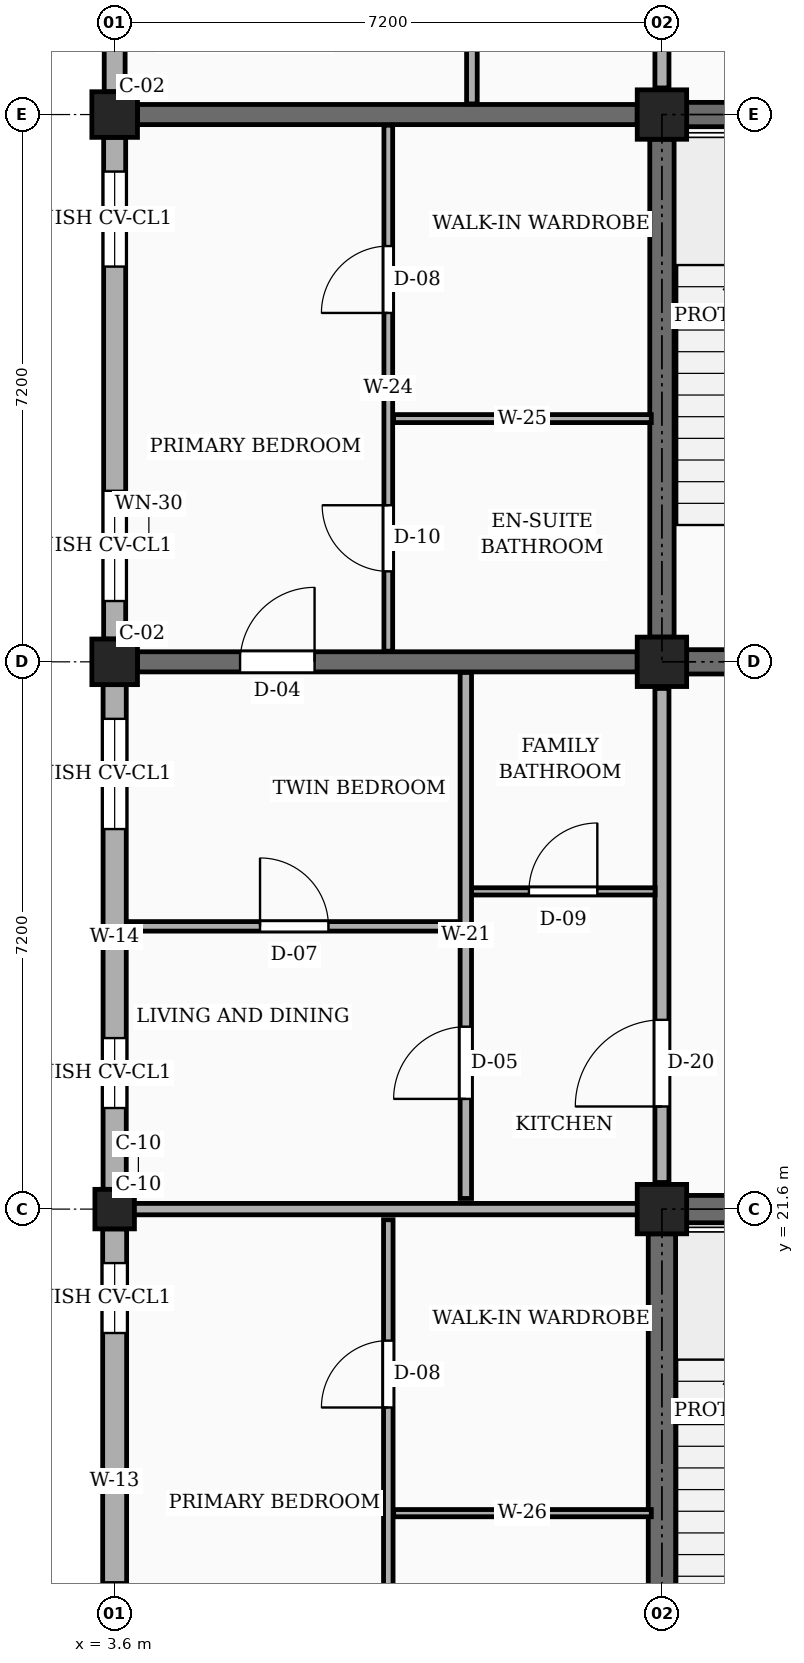
"""IFC4 building model, lengths in metres.
Left out: names, types, materials, properties, quantities, classifications, styles, units other than length and angle.
Written with IfcOpenShell. Run it as: python <this file> out.ifc"""

import sys

from ifc_helpers import new_model, si_unit, direction, frame, frame_2d, origin, origin_2d, place, context, subcontext, project, spatial, rectangle, circle, extrude, element, fill, save


model = new_model("IFC4")
c1 = context("Model", 3, precision=1e-05, world=origin(), true_north=direction((0.0, 1.0)))
c2 = subcontext(c1, "Body", "Model", "MODEL_VIEW")
j1 = project(units=[si_unit("LENGTHUNIT", "METRE"), si_unit("PLANEANGLEUNIT", "RADIAN")], contexts=[c1])
p1 = place(None, origin())
s1 = spatial("IfcSite", under=j1, at=p1, CompositionType="ELEMENT")
p2 = place(p1, origin())
s2 = spatial("IfcBuilding", under=s1, at=p2, CompositionType="ELEMENT")
p3 = place(p2, origin())
s3 = spatial("IfcBuildingStorey", under=s2, at=p3, CompositionType="ELEMENT", Elevation=0.0)
p4 = place(p3, frame((3.6, 21.6, 0.0), z_axis=(0.0, 0.0, 1.0), x_axis=(1.0, 0.0, 0.0)))
e1 = element("IfcColumn", 1, at=p4, inside=s3, PredefinedType="COLUMN", context=c2, shape_type="SweptSolid", body=[
    extrude(circle(Radius=0.26, at=origin_2d()), origin(), (0.0, 0.0, 1.0), 4.5),
])
for number, where, z_axis, x_axis in (
    (2, (3.6, 28.8, 0.0), (0.0, 0.0, 1.0), (1.0, 0.0, 0.0)),
    (3, (3.6, 36.0, 0.0), (0.0, 0.0, 1.0), (1.0, 0.0, 0.0)),
):
    element("IfcColumn", number, at=place(p3, frame(where, z_axis=z_axis, x_axis=x_axis)), inside=s3, PredefinedType="COLUMN", context=c2, shape_type="SweptSolid", body=[
        extrude(rectangle(XDim=0.6, YDim=0.6, at=origin_2d()), origin(), (0.0, 0.0, 1.0), 4.5),
    ])
for number, where, z_axis, x_axis in (
    (4, (10.8, 21.6, 0.0), (0.0, 0.0, 1.0), (1.0, 0.0, 0.0)),
    (5, (10.8, 28.8, 0.0), (0.0, 0.0, 1.0), (1.0, 0.0, 0.0)),
    (6, (10.8, 36.0, 0.0), (0.0, 0.0, 1.0), (1.0, 0.0, 0.0)),
):
    element("IfcColumn", number, at=place(p3, frame(where, z_axis=z_axis, x_axis=x_axis)), inside=s3, PredefinedType="COLUMN", context=c2, shape_type="SweptSolid", body=[
        extrude(rectangle(XDim=0.65, YDim=0.65, at=origin_2d()), origin(), (0.0, 0.0, 1.0), 4.5),
    ])
p5 = place(p3, frame((3.9, 28.8, 0.0), z_axis=(0.0, 0.0, 1.0), x_axis=(1.0, 0.0, 0.0)))
e7 = element("IfcWall", 7, at=p5, inside=s3, PredefinedType="SOLIDWALL", context=c2, shape_type="SweptSolid", body=[
    extrude(rectangle(XDim=6.575, YDim=0.265, at=frame_2d((3.288, 0.0))), origin(), (0.0, 0.0, 1.0), 3.52),
])
p6 = place(p5, frame((1.35, 0.0, 0.0)))
e8 = element("IfcOpeningElement", 8, at=p6, cuts=e7, PredefinedType="OPENING", context=c2, shape_type="SweptSolid", body=[
    extrude(rectangle(XDim=0.98, YDim=2.12, at=frame_2d((0.49, 1.06))), frame((0.0, 0.143, 0.0), z_axis=(0.0, -1.0, 0.0), x_axis=(1.0, 0.0, 0.0)), (0.0, 0.0, 1.0), 0.285),
])
p7 = place(p3, frame((3.9, 36.0, 0.0), z_axis=(0.0, 0.0, 1.0), x_axis=(1.0, 0.0, 0.0)))
e9 = element("IfcWall", 9, at=p7, inside=s3, PredefinedType="SOLIDWALL", context=c2, shape_type="SweptSolid", body=[
    extrude(rectangle(XDim=6.575, YDim=0.265, at=frame_2d((3.288, 0.0))), origin(), (0.0, 0.0, 1.0), 3.52),
])
p8 = place(p3, frame((3.6, 42.9, 0.0), z_axis=(0.0, 0.0, 1.0), x_axis=(0.0, -1.0, 0.0)))
e10 = element("IfcWall", 10, at=p8, inside=s3, PredefinedType="SOLIDWALL", context=c2, shape_type="SweptSolid", body=[
    extrude(rectangle(XDim=6.6, YDim=0.275, at=frame_2d((3.3, 0.0))), origin(), (0.0, 0.0, 1.0), 3.79),
])
p9 = place(p8, frame((0.45, 0.0, 0.78)))
e11 = element("IfcOpeningElement", 11, at=p9, cuts=e10, PredefinedType="OPENING", context=c2, shape_type="SweptSolid", body=[
    extrude(rectangle(XDim=1.05, YDim=1.44, at=frame_2d((0.525, 0.72))), frame((0.0, 0.147, 0.0), z_axis=(0.0, -1.0, 0.0), x_axis=(1.0, 0.0, 0.0)), (0.0, 0.0, 1.0), 0.295),
])
p10 = place(p8, frame((4.65, 0.0, 0.78)))
e12 = element("IfcOpeningElement", 12, at=p10, cuts=e10, PredefinedType="OPENING", context=c2, shape_type="SweptSolid", body=[
    extrude(rectangle(XDim=1.25, YDim=1.44, at=frame_2d((0.625, 0.72))), frame((0.0, 0.147, 0.0), z_axis=(0.0, -1.0, 0.0), x_axis=(1.0, 0.0, 0.0)), (0.0, 0.0, 1.0), 0.295),
])
p11 = place(p3, frame((3.6, 35.7, 0.0), z_axis=(0.0, 0.0, 1.0), x_axis=(0.0, -1.0, 0.0)))
e13 = element("IfcWall", 13, at=p11, inside=s3, PredefinedType="SOLIDWALL", context=c2, shape_type="SweptSolid", body=[
    extrude(rectangle(XDim=6.6, YDim=0.29, at=frame_2d((3.3, 0.0))), origin(), (0.0, 0.0, 1.0), 3.79),
])
p12 = place(p11, frame((0.45, 0.0, 0.78)))
e14 = element("IfcOpeningElement", 14, at=p12, cuts=e13, PredefinedType="OPENING", context=c2, shape_type="SweptSolid", body=[
    extrude(rectangle(XDim=1.25, YDim=1.44, at=frame_2d((0.625, 0.72))), frame((0.0, 0.155, 0.0), z_axis=(0.0, -1.0, 0.0), x_axis=(1.0, 0.0, 0.0)), (0.0, 0.0, 1.0), 0.31),
])
p13 = place(p11, frame((4.65, 0.0, 0.78)))
e15 = element("IfcOpeningElement", 15, at=p13, cuts=e13, PredefinedType="OPENING", context=c2, shape_type="SweptSolid", body=[
    extrude(rectangle(XDim=1.45, YDim=1.44, at=frame_2d((0.725, 0.72))), frame((0.0, 0.155, 0.0), z_axis=(0.0, -1.0, 0.0), x_axis=(1.0, 0.0, 0.0)), (0.0, 0.0, 1.0), 0.31),
])
p14 = place(p3, frame((3.6, 28.5, 0.0), z_axis=(0.0, 0.0, 1.0), x_axis=(0.0, -1.0, 0.0)))
e16 = element("IfcWall", 16, at=p14, inside=s3, PredefinedType="SOLIDWALL", context=c2, shape_type="SweptSolid", body=[
    extrude(rectangle(XDim=6.64, YDim=0.305, at=frame_2d((3.32, 0.0))), origin(), (0.0, 0.0, 1.0), 3.79),
])
p15 = place(p14, frame((0.45, 0.0, 0.78)))
e17 = element("IfcOpeningElement", 17, at=p15, cuts=e16, PredefinedType="OPENING", context=c2, shape_type="SweptSolid", body=[
    extrude(rectangle(XDim=1.45, YDim=1.44, at=frame_2d((0.725, 0.72))), frame((0.0, 0.163, 0.0), z_axis=(0.0, -1.0, 0.0), x_axis=(1.0, 0.0, 0.0)), (0.0, 0.0, 1.0), 0.325),
])
p16 = place(p14, frame((4.65, 0.0, 0.78)))
e18 = element("IfcOpeningElement", 18, at=p16, cuts=e16, PredefinedType="OPENING", context=c2, shape_type="SweptSolid", body=[
    extrude(rectangle(XDim=0.92, YDim=1.15, at=frame_2d((0.46, 0.575))), frame((0.0, 0.163, 0.0), z_axis=(0.0, -1.0, 0.0), x_axis=(1.0, 0.0, 0.0)), (0.0, 0.0, 1.0), 0.325),
])
p17 = place(p3, frame((3.6, 21.34, 0.0), z_axis=(0.0, 0.0, 1.0), x_axis=(0.0, -1.0, 0.0)))
e19 = element("IfcWall", 19, at=p17, inside=s3, PredefinedType="SOLIDWALL", context=c2, shape_type="SweptSolid", body=[
    extrude(rectangle(XDim=6.64, YDim=0.315, at=frame_2d((3.32, 0.0))), origin(), (0.0, 0.0, 1.0), 3.79),
])
p18 = place(p17, frame((0.45, 0.0, 0.78)))
e20 = element("IfcOpeningElement", 20, at=p18, cuts=e19, PredefinedType="OPENING", context=c2, shape_type="SweptSolid", body=[
    extrude(rectangle(XDim=0.92, YDim=1.15, at=frame_2d((0.46, 0.575))), frame((0.0, 0.167, 0.0), z_axis=(0.0, -1.0, 0.0), x_axis=(1.0, 0.0, 0.0)), (0.0, 0.0, 1.0), 0.335),
])
p19 = place(p17, frame((4.65, 0.0, 0.78)))
e21 = element("IfcOpeningElement", 21, at=p19, cuts=e19, PredefinedType="OPENING", context=c2, shape_type="SweptSolid", body=[
    extrude(rectangle(XDim=1.08, YDim=1.15, at=frame_2d((0.54, 0.575))), frame((0.0, 0.167, 0.0), z_axis=(0.0, -1.0, 0.0), x_axis=(1.0, 0.0, 0.0)), (0.0, 0.0, 1.0), 0.335),
])
p20 = place(p3, frame((10.8, 14.725, 0.0), z_axis=(0.0, 0.0, 1.0), x_axis=(0.0, 1.0, 0.0)))
e22 = element("IfcWall", 22, at=p20, inside=s3, PredefinedType="SHEAR", context=c2, shape_type="SweptSolid", body=[
    extrude(rectangle(XDim=6.55, YDim=0.36, at=frame_2d((3.275, 0.0))), origin(), (0.0, 0.0, 1.0), 4.22),
])
p21 = place(p3, frame((11.125, 21.6, 0.0), z_axis=(0.0, 0.0, 1.0), x_axis=(1.0, 0.0, 0.0)))
e23 = element("IfcWall", 23, at=p21, inside=s3, PredefinedType="SHEAR", context=c2, shape_type="SweptSolid", body=[
    extrude(rectangle(XDim=6.55, YDim=0.36, at=frame_2d((3.275, 0.0))), origin(), (0.0, 0.0, 1.0), 4.22),
])
for number, where, z_axis, x_axis in (
    (24, (10.8, 29.125, 0.0), (0.0, 0.0, 1.0), (0.0, 1.0, 0.0)),
    (25, (11.125, 36.0, 0.0), (0.0, 0.0, 1.0), (1.0, 0.0, 0.0)),
):
    element("IfcWall", number, at=place(p3, frame(where, z_axis=z_axis, x_axis=x_axis)), inside=s3, PredefinedType="SHEAR", context=c2, shape_type="SweptSolid", body=[
        extrude(rectangle(XDim=6.55, YDim=0.32, at=frame_2d((3.275, 0.0))), origin(), (0.0, 0.0, 1.0), 4.22),
    ])
p22 = place(p3, frame((11.125, 28.8, 0.0), z_axis=(0.0, 0.0, 1.0), x_axis=(1.0, 0.0, 0.0)))
e26 = element("IfcWall", 26, at=p22, inside=s3, PredefinedType="SHEAR", context=c2, shape_type="SweptSolid", body=[
    extrude(rectangle(XDim=6.55, YDim=0.32, at=frame_2d((3.275, 0.0))), origin(), (0.0, 0.0, 1.0), 4.22),
])
p23 = place(p22, frame((4.425, 0.0, 0.0)))
e27 = element("IfcOpeningElement", 27, at=p23, cuts=e26, PredefinedType="OPENING", context=c2, shape_type="SweptSolid", body=[
    extrude(rectangle(XDim=1.1, YDim=2.15, at=frame_2d((0.55, 1.075))), frame((0.0, 0.17, 0.0), z_axis=(0.0, -1.0, 0.0), x_axis=(1.0, 0.0, 0.0)), (0.0, 0.0, 1.0), 0.34),
])
p24 = place(p3, frame((10.8, 21.95, 0.0), z_axis=(0.0, 0.0, 1.0), x_axis=(0.0, 1.0, 0.0)))
e28 = element("IfcWall", 28, at=p24, inside=s3, PredefinedType="PARTITIONING", context=c2, shape_type="SweptSolid", body=[
    extrude(rectangle(XDim=6.5, YDim=0.185, at=frame_2d((3.25, 0.0))), origin(), (0.0, 0.0, 1.0), 3.47),
])
p25 = place(p24, frame((1.0, 0.0, 0.0)))
e29 = element("IfcOpeningElement", 29, at=p25, cuts=e28, PredefinedType="OPENING", context=c2, shape_type="SweptSolid", body=[
    extrude(rectangle(XDim=1.14, YDim=2.18, at=frame_2d((0.57, 1.09))), frame((0.0, 0.103, 0.0), z_axis=(0.0, -1.0, 0.0), x_axis=(1.0, 0.0, 0.0)), (0.0, 0.0, 1.0), 0.205),
])
p26 = place(p3, frame((10.8, 36.35, 0.0), z_axis=(0.0, 0.0, 1.0), x_axis=(0.0, 1.0, 0.0)))
e30 = element("IfcWall", 30, at=p26, inside=s3, PredefinedType="PARTITIONING", context=c2, shape_type="SweptSolid", body=[
    extrude(rectangle(XDim=6.5, YDim=0.185, at=frame_2d((3.25, 0.0))), origin(), (0.0, 0.0, 1.0), 3.47),
])
p27 = place(p26, frame((1.0, 0.0, 0.0)))
e31 = element("IfcOpeningElement", 31, at=p27, cuts=e30, PredefinedType="OPENING", context=c2, shape_type="SweptSolid", body=[
    extrude(rectangle(XDim=1.0, YDim=2.15, at=frame_2d((0.5, 1.075))), frame((0.0, 0.103, 0.0), z_axis=(0.0, -1.0, 0.0), x_axis=(1.0, 0.0, 0.0)), (0.0, 0.0, 1.0), 0.205),
])
p28 = place(p3, frame((3.775, 21.6, 0.0), z_axis=(0.0, 0.0, 1.0), x_axis=(1.0, 0.0, 0.0)))
e32 = element("IfcWall", 32, at=p28, inside=s3, PredefinedType="PARTITIONING", context=c2, shape_type="SweptSolid", body=[
    extrude(rectangle(XDim=6.885, YDim=0.15, at=frame_2d((3.442, 0.0))), origin(), (0.0, 0.0, 1.0), 3.27),
])
p29 = place(p3, frame((7.2, 14.54, 0.0), z_axis=(0.0, 0.0, 1.0), x_axis=(0.0, 1.0, 0.0)))
e33 = element("IfcWall", 33, at=p29, inside=s3, PredefinedType="PARTITIONING", context=c2, shape_type="SweptSolid", body=[
    extrude(rectangle(XDim=6.92, YDim=0.125, at=frame_2d((3.46, 0.0))), origin(), (0.0, 0.0, 1.0), 3.655),
])
p30 = place(p29, frame((1.05, 0.0, 0.0)))
e34 = element("IfcOpeningElement", 34, at=p30, cuts=e33, PredefinedType="OPENING", context=c2, shape_type="SweptSolid", body=[
    extrude(rectangle(XDim=0.87, YDim=2.05, at=frame_2d((0.435, 1.025))), frame((0.0, 0.073, 0.0), z_axis=(0.0, -1.0, 0.0), x_axis=(1.0, 0.0, 0.0)), (0.0, 0.0, 1.0), 0.145),
])
p31 = place(p29, frame((4.45, 0.0, 0.0)))
e35 = element("IfcOpeningElement", 35, at=p31, cuts=e33, PredefinedType="OPENING", context=c2, shape_type="SweptSolid", body=[
    extrude(rectangle(XDim=0.88, YDim=2.08, at=frame_2d((0.44, 1.04))), frame((0.0, 0.073, 0.0), z_axis=(0.0, -1.0, 0.0), x_axis=(1.0, 0.0, 0.0)), (0.0, 0.0, 1.0), 0.145),
])
p32 = place(p3, frame((7.27, 17.6, 0.0), z_axis=(0.0, 0.0, 1.0), x_axis=(1.0, 0.0, 0.0)))
e36 = element("IfcWall", 36, at=p32, inside=s3, PredefinedType="PARTITIONING", context=c2, shape_type="SweptSolid", body=[
    extrude(rectangle(XDim=3.39, YDim=0.095, at=frame_2d((1.695, 0.0))), origin(), (0.0, 0.0, 1.0), 3.655),
])
p33 = place(p3, frame((3.775, 25.32, 0.0), z_axis=(0.0, 0.0, 1.0), x_axis=(1.0, 0.0, 0.0)))
e37 = element("IfcWall", 37, at=p33, inside=s3, PredefinedType="PARTITIONING", context=c2, shape_type="SweptSolid", body=[
    extrude(rectangle(XDim=4.375, YDim=0.125, at=frame_2d((2.188, 0.0))), origin(), (0.0, 0.0, 1.0), 3.655),
])
p34 = place(p33, frame((1.738, 0.0, 0.0)))
e38 = element("IfcOpeningElement", 38, at=p34, cuts=e37, PredefinedType="OPENING", context=c2, shape_type="SweptSolid", body=[
    extrude(rectangle(XDim=0.9, YDim=2.1, at=frame_2d((0.45, 1.05))), frame((0.0, 0.073, 0.0), z_axis=(0.0, -1.0, 0.0), x_axis=(1.0, 0.0, 0.0)), (0.0, 0.0, 1.0), 0.145),
])
p35 = place(p3, frame((8.29, 25.78, 0.0), z_axis=(0.0, 0.0, 1.0), x_axis=(1.0, 0.0, 0.0)))
e39 = element("IfcWall", 39, at=p35, inside=s3, PredefinedType="PARTITIONING", context=c2, shape_type="SweptSolid", body=[
    extrude(rectangle(XDim=2.42, YDim=0.095, at=frame_2d((1.21, 0.0))), origin(), (0.0, 0.0, 1.0), 3.655),
])
p36 = place(p35, frame((0.76, 0.0, 0.0)))
e40 = element("IfcOpeningElement", 40, at=p36, cuts=e39, PredefinedType="OPENING", context=c2, shape_type="SweptSolid", body=[
    extrude(rectangle(XDim=0.9, YDim=2.05, at=frame_2d((0.45, 1.025))), frame((0.0, 0.058, 0.0), z_axis=(0.0, -1.0, 0.0), x_axis=(1.0, 0.0, 0.0)), (0.0, 0.0, 1.0), 0.115),
])
p37 = place(p3, frame((8.22, 21.74, 0.0), z_axis=(0.0, 0.0, 1.0), x_axis=(0.0, 1.0, 0.0)))
e41 = element("IfcWall", 41, at=p37, inside=s3, PredefinedType="PARTITIONING", context=c2, shape_type="SweptSolid", body=[
    extrude(rectangle(XDim=6.92, YDim=0.15, at=frame_2d((3.46, 0.0))), origin(), (0.0, 0.0, 1.0), 3.655),
])
p38 = place(p37, frame((1.31, 0.0, 0.0)))
e42 = element("IfcOpeningElement", 42, at=p38, cuts=e41, PredefinedType="OPENING", context=c2, shape_type="SweptSolid", body=[
    extrude(rectangle(XDim=0.95, YDim=2.1, at=frame_2d((0.475, 1.05))), frame((0.0, 0.085, 0.0), z_axis=(0.0, -1.0, 0.0), x_axis=(1.0, 0.0, 0.0)), (0.0, 0.0, 1.0), 0.17),
])
p39 = place(p3, frame((7.2, 28.94, 0.0), z_axis=(0.0, 0.0, 1.0), x_axis=(0.0, 1.0, 0.0)))
e43 = element("IfcWall", 43, at=p39, inside=s3, PredefinedType="PARTITIONING", context=c2, shape_type="SweptSolid", body=[
    extrude(rectangle(XDim=6.92, YDim=0.115, at=frame_2d((3.46, 0.0))), origin(), (0.0, 0.0, 1.0), 3.655),
])
p40 = place(p39, frame((1.05, 0.0, 0.0)))
e44 = element("IfcOpeningElement", 44, at=p40, cuts=e43, PredefinedType="OPENING", context=c2, shape_type="SweptSolid", body=[
    extrude(rectangle(XDim=0.87, YDim=2.05, at=frame_2d((0.435, 1.025))), frame((0.0, 0.067, 0.0), z_axis=(0.0, -1.0, 0.0), x_axis=(1.0, 0.0, 0.0)), (0.0, 0.0, 1.0), 0.135),
])
p41 = place(p39, frame((4.45, 0.0, 0.0)))
e45 = element("IfcOpeningElement", 45, at=p41, cuts=e43, PredefinedType="OPENING", context=c2, shape_type="SweptSolid", body=[
    extrude(rectangle(XDim=0.88, YDim=2.08, at=frame_2d((0.44, 1.04))), frame((0.0, 0.067, 0.0), z_axis=(0.0, -1.0, 0.0), x_axis=(1.0, 0.0, 0.0)), (0.0, 0.0, 1.0), 0.135),
])
p42 = place(p3, frame((7.27, 32.0, 0.0), z_axis=(0.0, 0.0, 1.0), x_axis=(1.0, 0.0, 0.0)))
e46 = element("IfcWall", 46, at=p42, inside=s3, PredefinedType="PARTITIONING", context=c2, shape_type="SweptSolid", body=[
    extrude(rectangle(XDim=3.39, YDim=0.105, at=frame_2d((1.695, 0.0))), origin(), (0.0, 0.0, 1.0), 3.655),
])
p43 = place(p3, frame((8.3, 36.14, 0.0), z_axis=(0.0, 0.0, 1.0), x_axis=(0.0, 1.0, 0.0)))
e47 = element("IfcWall", 47, at=p43, inside=s3, PredefinedType="PARTITIONING", context=c2, shape_type="SweptSolid", body=[
    extrude(rectangle(XDim=6.92, YDim=0.14, at=frame_2d((3.46, 0.0))), origin(), (0.0, 0.0, 1.0), 3.655),
])
p44 = place(p43, frame((1.31, 0.0, 0.0)))
e48 = element("IfcOpeningElement", 48, at=p44, cuts=e47, PredefinedType="OPENING", context=c2, shape_type="SweptSolid", body=[
    extrude(rectangle(XDim=0.95, YDim=2.1, at=frame_2d((0.475, 1.05))), frame((0.0, 0.08, 0.0), z_axis=(0.0, -1.0, 0.0), x_axis=(1.0, 0.0, 0.0)), (0.0, 0.0, 1.0), 0.16),
])
p45 = place(p12, origin())
e49 = element("IfcWindow", 49, at=p45, inside=s3, PartitioningType="SINGLE_PANEL", PredefinedType="WINDOW", context=c2, shape_type="SweptSolid", body=[
    extrude(rectangle(XDim=1.25, YDim=1.44, at=frame_2d((0.625, 0.72))), frame((0.0, 0.03, 0.0), z_axis=(0.0, -1.0, 0.0), x_axis=(1.0, 0.0, 0.0)), (0.0, 0.0, 1.0), 0.06),
])
fill(e14, e49)
p46 = place(p13, origin())
e50 = element("IfcWindow", 50, at=p46, inside=s3, PartitioningType="SINGLE_PANEL", PredefinedType="WINDOW", context=c2, shape_type="SweptSolid", body=[
    extrude(rectangle(XDim=1.45, YDim=1.44, at=frame_2d((0.725, 0.72))), frame((0.0, 0.03, 0.0), z_axis=(0.0, -1.0, 0.0), x_axis=(1.0, 0.0, 0.0)), (0.0, 0.0, 1.0), 0.06),
])
fill(e15, e50)
p47 = place(p15, origin())
e51 = element("IfcWindow", 51, at=p47, inside=s3, PartitioningType="SINGLE_PANEL", PredefinedType="WINDOW", context=c2, shape_type="SweptSolid", body=[
    extrude(rectangle(XDim=1.45, YDim=1.44, at=frame_2d((0.725, 0.72))), frame((0.0, 0.03, 0.0), z_axis=(0.0, -1.0, 0.0), x_axis=(1.0, 0.0, 0.0)), (0.0, 0.0, 1.0), 0.06),
])
fill(e17, e51)
p48 = place(p16, origin())
e52 = element("IfcWindow", 52, at=p48, inside=s3, PartitioningType="SINGLE_PANEL", PredefinedType="WINDOW", context=c2, shape_type="SweptSolid", body=[
    extrude(rectangle(XDim=0.92, YDim=1.15, at=frame_2d((0.46, 0.575))), frame((0.0, 0.03, 0.0), z_axis=(0.0, -1.0, 0.0), x_axis=(1.0, 0.0, 0.0)), (0.0, 0.0, 1.0), 0.06),
])
fill(e18, e52)
p49 = place(p18, origin())
e53 = element("IfcWindow", 53, at=p49, inside=s3, PartitioningType="SINGLE_PANEL", PredefinedType="WINDOW", context=c2, shape_type="SweptSolid", body=[
    extrude(rectangle(XDim=0.92, YDim=1.15, at=frame_2d((0.46, 0.575))), frame((0.0, 0.03, 0.0), z_axis=(0.0, -1.0, 0.0), x_axis=(1.0, 0.0, 0.0)), (0.0, 0.0, 1.0), 0.06),
])
fill(e20, e53)
p50 = place(p19, origin())
e54 = element("IfcWindow", 54, at=p50, inside=s3, PartitioningType="SINGLE_PANEL", PredefinedType="WINDOW", context=c2, shape_type="SweptSolid", body=[
    extrude(rectangle(XDim=1.08, YDim=1.15, at=frame_2d((0.54, 0.575))), frame((0.0, 0.03, 0.0), z_axis=(0.0, -1.0, 0.0), x_axis=(1.0, 0.0, 0.0)), (0.0, 0.0, 1.0), 0.06),
])
fill(e21, e54)
p51 = place(p25, origin())
e55 = element("IfcDoor", 55, at=p51, inside=s3, OperationType="SINGLE_SWING_LEFT", PredefinedType="DOOR", context=c2, shape_type="SweptSolid", body=[
    extrude(rectangle(XDim=1.14, YDim=2.18, at=frame_2d((0.57, 1.09))), frame((0.0, 0.025, 0.0), z_axis=(0.0, -1.0, 0.0), x_axis=(1.0, 0.0, 0.0)), (0.0, 0.0, 1.0), 0.05),
])
fill(e29, e55)
p52 = place(p31, origin())
e56 = element("IfcDoor", 56, at=p52, inside=s3, OperationType="SINGLE_SWING_LEFT", PredefinedType="DOOR", context=c2, shape_type="SweptSolid", body=[
    extrude(rectangle(XDim=0.88, YDim=2.08, at=frame_2d((0.44, 1.04))), frame((0.0, 0.025, 0.0), z_axis=(0.0, -1.0, 0.0), x_axis=(1.0, 0.0, 0.0)), (0.0, 0.0, 1.0), 0.05),
])
fill(e35, e56)
p53 = place(p34, origin())
e57 = element("IfcDoor", 57, at=p53, inside=s3, OperationType="SINGLE_SWING_LEFT", PredefinedType="DOOR", context=c2, shape_type="SweptSolid", body=[
    extrude(rectangle(XDim=0.9, YDim=2.1, at=frame_2d((0.45, 1.05))), frame((0.0, 0.025, 0.0), z_axis=(0.0, -1.0, 0.0), x_axis=(1.0, 0.0, 0.0)), (0.0, 0.0, 1.0), 0.05),
])
fill(e38, e57)
p54 = place(p36, origin())
e58 = element("IfcDoor", 58, at=p54, inside=s3, OperationType="SINGLE_SWING_RIGHT", PredefinedType="DOOR", context=c2, shape_type="SweptSolid", body=[
    extrude(rectangle(XDim=0.9, YDim=2.05, at=frame_2d((0.45, 1.025))), frame((0.0, 0.025, 0.0), z_axis=(0.0, -1.0, 0.0), x_axis=(1.0, 0.0, 0.0)), (0.0, 0.0, 1.0), 0.05),
])
fill(e40, e58)
p55 = place(p38, origin())
e59 = element("IfcDoor", 59, at=p55, inside=s3, OperationType="SINGLE_SWING_LEFT", PredefinedType="DOOR", context=c2, shape_type="SweptSolid", body=[
    extrude(rectangle(XDim=0.95, YDim=2.1, at=frame_2d((0.475, 1.05))), frame((0.0, 0.025, 0.0), z_axis=(0.0, -1.0, 0.0), x_axis=(1.0, 0.0, 0.0)), (0.0, 0.0, 1.0), 0.05),
])
fill(e42, e59)
p56 = place(p40, origin())
e60 = element("IfcDoor", 60, at=p56, inside=s3, OperationType="SINGLE_SWING_RIGHT", PredefinedType="DOOR", context=c2, shape_type="SweptSolid", body=[
    extrude(rectangle(XDim=0.87, YDim=2.05, at=frame_2d((0.435, 1.025))), frame((0.0, 0.025, 0.0), z_axis=(0.0, -1.0, 0.0), x_axis=(1.0, 0.0, 0.0)), (0.0, 0.0, 1.0), 0.05),
])
fill(e44, e60)
p57 = place(p41, origin())
e61 = element("IfcDoor", 61, at=p57, inside=s3, OperationType="SINGLE_SWING_LEFT", PredefinedType="DOOR", context=c2, shape_type="SweptSolid", body=[
    extrude(rectangle(XDim=0.88, YDim=2.08, at=frame_2d((0.44, 1.04))), frame((0.0, 0.025, 0.0), z_axis=(0.0, -1.0, 0.0), x_axis=(1.0, 0.0, 0.0)), (0.0, 0.0, 1.0), 0.05),
])
fill(e45, e61)
p58 = place(p6, origin())
e62 = element("IfcDoor", 62, at=p58, inside=s3, OperationType="SINGLE_SWING_RIGHT", PredefinedType="DOOR", context=c2, shape_type="SweptSolid", body=[
    extrude(rectangle(XDim=0.98, YDim=2.12, at=frame_2d((0.49, 1.06))), frame((0.0, 0.025, 0.0), z_axis=(0.0, -1.0, 0.0), x_axis=(1.0, 0.0, 0.0)), (0.0, 0.0, 1.0), 0.05),
])
fill(e8, e62)
save(model, sys.argv[1])
